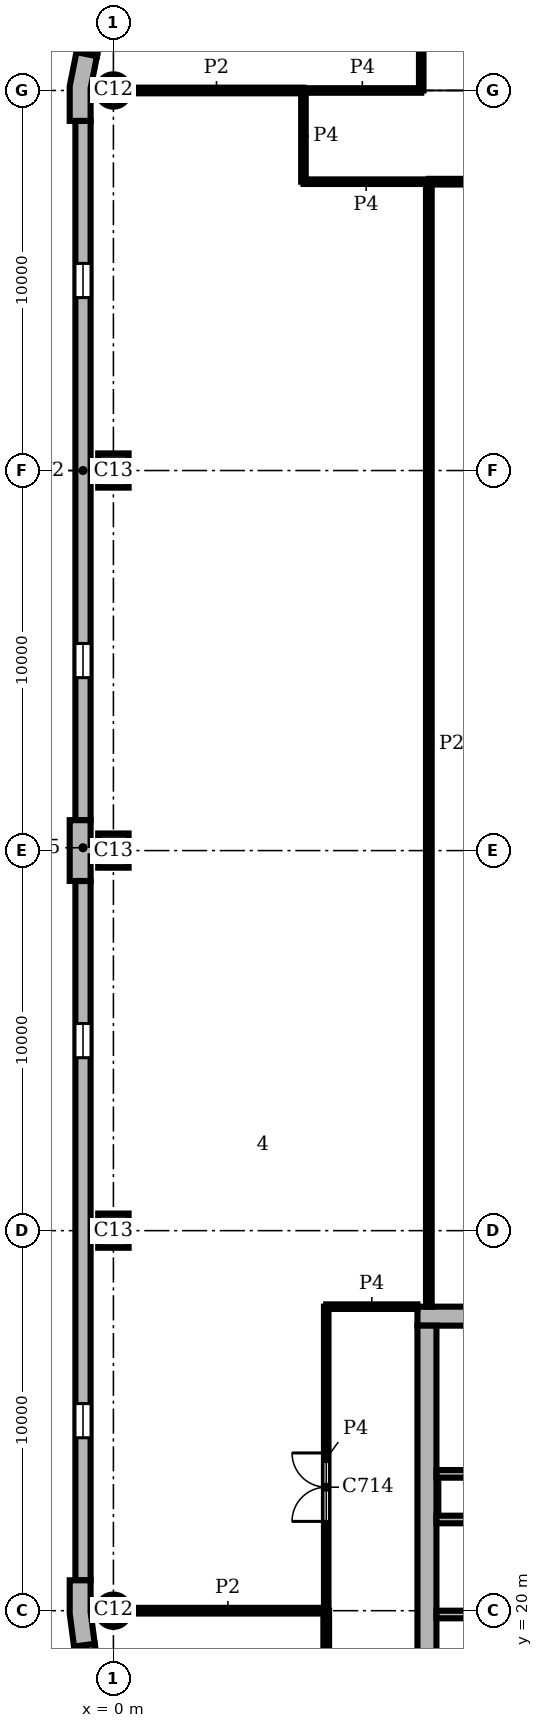
"""IFC4 building model, lengths in metres.
Left out: names, types, materials, properties, quantities, classifications, styles, units other than length and angle.
Written with IfcOpenShell. Run it as: python <this file> out.ifc"""

import sys

from ifc_helpers import new_model, si_unit, direction, frame, frame_2d, origin, origin_2d, place, context, subcontext, project, spatial, polyline, rectangle, circle, outline, extrude, element, fill, save


model = new_model("IFC4")
c1 = context("Model", 3, precision=1e-05, world=origin(), true_north=direction((0.0, 1.0)))
c2 = subcontext(c1, "Body", "Model", "MODEL_VIEW")
j1 = project(units=[si_unit("LENGTHUNIT", "METRE"), si_unit("PLANEANGLEUNIT", "RADIAN")], contexts=[c1])
p1 = place(None, origin())
s1 = spatial("IfcSite", under=j1, at=p1, CompositionType="ELEMENT")
p2 = place(p1, origin())
s2 = spatial("IfcBuilding", under=s1, at=p2, CompositionType="ELEMENT")
p3 = place(p2, frame((0.0, 0.0, 309.9)))
s3 = spatial("IfcBuildingStorey", under=s2, at=p3, CompositionType="ELEMENT", Elevation=309.9)
p4 = place(p3, frame((0.0, 60.0, 0.0), z_axis=(0.0, 0.0, 1.0), x_axis=(1.0, 0.0, 0.0)))
e1 = element("IfcColumn", 1, at=p4, inside=s3, PredefinedType="COLUMN", context=c2, shape_type="SweptSolid", body=[
    extrude(circle(Radius=0.425, at=origin_2d()), origin(), (0.0, 0.0, 1.0), 3.9),
])
for number, where, z_axis, x_axis in (
    (2, (0.0, 50.0, 0.0), (0.0, 0.0, 1.0), (0.0, 1.0, 0.0)),
    (3, (0.0, 40.0, 0.0), (0.0, 0.0, 1.0), (0.0, 1.0, 0.0)),
    (4, (0.0, 30.0, 0.0), (0.0, 0.0, 1.0), (0.0, 1.0, 0.0)),
):
    element("IfcColumn", number, at=place(p3, frame(where, z_axis=z_axis, x_axis=x_axis)), inside=s3, PredefinedType="COLUMN", context=c2, shape_type="SweptSolid", body=[
        extrude(rectangle(XDim=0.9, YDim=0.8, at=origin_2d()), origin(), (0.0, 0.0, 1.0), 3.9),
    ])
p5 = place(p3, frame((0.0, 20.0, 0.0), z_axis=(0.0, 0.0, 1.0), x_axis=(1.0, 0.0, 0.0)))
e5 = element("IfcColumn", 5, at=p5, inside=s3, PredefinedType="COLUMN", context=c2, shape_type="SweptSolid", body=[
    extrude(circle(Radius=0.425, at=origin_2d()), origin(), (0.0, 0.0, 1.0), 3.9),
])
p6 = place(p3, frame((28.0, 27.75, 0.0), z_axis=(0.0, 0.0, 1.0), x_axis=(-1.0, 0.0, 0.0)))
e6 = element("IfcWall", 6, at=p6, inside=s3, PredefinedType="SHEAR", context=c2, shape_type="SweptSolid", body=[
    extrude(rectangle(XDim=20.0, YDim=0.5, at=frame_2d((10.0, 0.0))), origin(), (0.0, 0.0, 1.0), 3.9),
])
p7 = place(p3, frame((8.25, 27.5, 0.0), z_axis=(0.0, 0.0, 1.0), x_axis=(0.0, -1.0, 0.0)))
e7 = element("IfcWall", 7, at=p7, inside=s3, PredefinedType="SHEAR", context=c2, shape_type="SweptSolid", body=[
    extrude(rectangle(XDim=19.0, YDim=0.5, at=frame_2d((9.5, 0.0))), origin(), (0.0, 0.0, 1.0), 3.9),
])
p8 = place(p3, origin())
e8 = element("IfcWall", 8, at=p8, inside=s3, PredefinedType="SOLIDWALL", context=c2, shape_type="SweptSolid", body=[
    extrude(outline(polyline([(-0.825, 60.98), (-0.972, 61.009), (-1.15, 60.113), (-1.15, 59.2), (-1.0, 59.2), (-0.6, 59.2), (-0.6, 60.059), (-0.432, 60.902), (-0.825, 60.98)])), origin(), (0.0, 0.0, 1.0), 3.9),
])
e9 = element("IfcWall", 9, at=p8, inside=s3, PredefinedType="SOLIDWALL", context=c2, shape_type="SweptSolid", body=[
    extrude(outline(polyline([(-0.6, 39.2), (-0.6, 39.85), (-0.45, 39.85), (-0.45, 40.15), (-0.6, 40.15), (-0.6, 40.8), (-1.0, 40.8), (-1.15, 40.8), (-1.15, 40.0), (-1.15, 39.2), (-1.0, 39.2), (-0.6, 39.2)])), origin(), (0.0, 0.0, 1.0), 3.9),
])
e10 = element("IfcWall", 10, at=p8, inside=s3, PredefinedType="SOLIDWALL", context=c2, shape_type="SweptSolid", body=[
    extrude(outline(polyline([(-1.0, 20.8), (-1.15, 20.8), (-1.15, 19.925), (-1.036, 19.057), (-0.887, 19.076), (-0.49, 19.128), (-0.6, 19.961), (-0.6, 20.8), (-1.0, 20.8)])), origin(), (0.0, 0.0, 1.0), 3.9),
])
p9 = place(p3, frame((0.299, 65.602, 0.0), z_axis=(0.0, 0.0, 1.0), x_axis=(-0.195098533057, -0.98078364709, 0.0)))
e11 = element("IfcWall", 11, at=p9, inside=s3, PredefinedType="SOLIDWALL", context=c2, shape_type="SweptSolid", body=[
    extrude(rectangle(XDim=4.753, YDim=0.4, at=frame_2d((2.376, 0.0))), origin(), (0.0, 0.0, 1.0), 3.9),
])
p10 = place(p9, frame((0.226, 0.0, 0.9)))
e12 = element("IfcOpeningElement", 12, at=p10, cuts=e11, PredefinedType="OPENING", context=c2, shape_type="SweptSolid", body=[
    extrude(rectangle(XDim=4.3, YDim=2.35, at=frame_2d((2.15, 1.175))), frame((0.0, 0.21, 0.0), z_axis=(0.0, -1.0, 0.0), x_axis=(1.0, 0.0, 0.0)), (0.0, 0.0, 1.0), 0.42),
])
p11 = place(p3, frame((-0.8, 59.2, 0.0), z_axis=(0.0, 0.0, 1.0), x_axis=(0.0, -1.0, 0.0)))
e13 = element("IfcWall", 13, at=p11, inside=s3, PredefinedType="SOLIDWALL", context=c2, shape_type="SweptSolid", body=[
    extrude(rectangle(XDim=18.4, YDim=0.4, at=frame_2d((9.2, 0.0))), origin(), (0.0, 0.0, 1.0), 3.9),
])
p12 = place(p11, frame((3.75, 0.0, 0.9)))
e14 = element("IfcOpeningElement", 14, at=p12, cuts=e13, PredefinedType="OPENING", context=c2, shape_type="SweptSolid", body=[
    extrude(rectangle(XDim=0.9, YDim=2.35, at=frame_2d((0.45, 1.175))), frame((0.0, 0.21, 0.0), z_axis=(0.0, -1.0, 0.0), x_axis=(1.0, 0.0, 0.0)), (0.0, 0.0, 1.0), 0.42),
])
p13 = place(p11, frame((13.75, 0.0, 0.9)))
e15 = element("IfcOpeningElement", 15, at=p13, cuts=e13, PredefinedType="OPENING", context=c2, shape_type="SweptSolid", body=[
    extrude(rectangle(XDim=0.9, YDim=2.35, at=frame_2d((0.45, 1.175))), frame((0.0, 0.21, 0.0), z_axis=(0.0, -1.0, 0.0), x_axis=(1.0, 0.0, 0.0)), (0.0, 0.0, 1.0), 0.42),
])
p14 = place(p3, frame((-0.8, 39.2, 0.0), z_axis=(0.0, 0.0, 1.0), x_axis=(0.0, -1.0, 0.0)))
e16 = element("IfcWall", 16, at=p14, inside=s3, PredefinedType="SOLIDWALL", context=c2, shape_type="SweptSolid", body=[
    extrude(rectangle(XDim=18.4, YDim=0.4, at=frame_2d((9.2, 0.0))), origin(), (0.0, 0.0, 1.0), 3.9),
])
p15 = place(p14, frame((3.75, 0.0, 0.9)))
e17 = element("IfcOpeningElement", 17, at=p15, cuts=e16, PredefinedType="OPENING", context=c2, shape_type="SweptSolid", body=[
    extrude(rectangle(XDim=0.9, YDim=2.35, at=frame_2d((0.45, 1.175))), frame((0.0, 0.21, 0.0), z_axis=(0.0, -1.0, 0.0), x_axis=(1.0, 0.0, 0.0)), (0.0, 0.0, 1.0), 0.42),
])
p16 = place(p14, frame((13.75, 0.0, 0.9)))
e18 = element("IfcOpeningElement", 18, at=p16, cuts=e16, PredefinedType="OPENING", context=c2, shape_type="SweptSolid", body=[
    extrude(rectangle(XDim=0.9, YDim=2.35, at=frame_2d((0.45, 1.175))), frame((0.0, 0.21, 0.0), z_axis=(0.0, -1.0, 0.0), x_axis=(1.0, 0.0, 0.0)), (0.0, 0.0, 1.0), 0.42),
])
p17 = place(p3, frame((-0.689, 19.102, 0.0), z_axis=(0.0, 0.0, 1.0), x_axis=(0.130514280502, -0.991446429508, 0.0)))
e19 = element("IfcWall", 19, at=p17, inside=s3, PredefinedType="SOLIDWALL", context=c2, shape_type="SweptSolid", body=[
    extrude(rectangle(XDim=4.121, YDim=0.4, at=frame_2d((2.061, 0.0))), origin(), (0.0, 0.0, 1.0), 3.9),
])
p18 = place(p17, frame((1.611, 0.0, 0.9)))
e20 = element("IfcOpeningElement", 20, at=p18, cuts=e19, PredefinedType="OPENING", context=c2, shape_type="SweptSolid", body=[
    extrude(rectangle(XDim=0.9, YDim=2.35, at=frame_2d((0.45, 1.175))), frame((0.0, 0.21, 0.0), z_axis=(0.0, -1.0, 0.0), x_axis=(1.0, 0.0, 0.0)), (0.0, 0.0, 1.0), 0.42),
])
for number, where, z_axis, x_axis in (
    (21, (8.5, 19.9, 0.0), (0.0, 0.0, 1.0), (1.0, 0.0, 0.0)),
    (22, (8.5, 22.4, 0.0), (0.0, 0.0, 1.0), (1.0, 0.0, 0.0)),
):
    element("IfcWall", number, at=place(p3, frame(where, z_axis=z_axis, x_axis=x_axis)), inside=s3, PredefinedType="SHEAR", context=c2, shape_type="SweptSolid", body=[
        extrude(rectangle(XDim=3.2, YDim=0.2, at=frame_2d((1.6, 0.0))), origin(), (0.0, 0.0, 1.0), 3.58),
    ])
p19 = place(p3, frame((8.5, 23.6, 0.0), z_axis=(0.0, 0.0, 1.0), x_axis=(1.0, 0.0, 0.0)))
e23 = element("IfcWall", 23, at=p19, inside=s3, PredefinedType="SHEAR", context=c2, shape_type="SweptSolid", body=[
    extrude(rectangle(XDim=5.3, YDim=0.2, at=frame_2d((2.65, 0.0))), origin(), (0.0, 0.0, 1.0), 3.58),
])
p20 = place(p3, frame((5.6, 15.0, 0.0), z_axis=(0.0, 0.0, 1.0), x_axis=(0.0, 1.0, 0.0)))
e24 = element("IfcWall", 24, at=p20, inside=s3, PredefinedType="PARTITIONING", context=c2, shape_type="SweptSolid", body=[
    extrude(rectangle(XDim=5.0, YDim=0.15, at=frame_2d((2.5, 0.0))), origin(), (0.0, 0.0, 1.0), 3.58),
])
p21 = place(p20, frame((1.85, 0.0, 0.0)))
e25 = element("IfcOpeningElement", 25, at=p21, cuts=e24, PredefinedType="OPENING", context=c2, shape_type="SweptSolid", body=[
    extrude(rectangle(XDim=0.8, YDim=2.1, at=frame_2d((0.4, 1.05))), frame((0.0, 0.085, 0.0), z_axis=(0.0, -1.0, 0.0), x_axis=(1.0, 0.0, 0.0)), (0.0, 0.0, 1.0), 0.17),
])
p22 = place(p3, frame((8.3, 28.0, 0.0), z_axis=(0.0, 0.0, 1.0), x_axis=(0.0, 1.0, 0.0)))
e26 = element("IfcWall", 26, at=p22, inside=s3, PredefinedType="PARTITIONING", context=c2, shape_type="SweptSolid", body=[
    extrude(rectangle(XDim=29.6, YDim=0.15, at=frame_2d((14.8, 0.0))), origin(), (0.0, 0.0, 1.0), 3.58),
])
p23 = place(p3, frame((0.425, 20.0, 0.0), z_axis=(0.0, 0.0, 1.0), x_axis=(1.0, 0.0, 0.0)))
e27 = element("IfcWall", 27, at=p23, inside=s3, PredefinedType="PARTITIONING", context=c2, shape_type="SweptSolid", body=[
    extrude(rectangle(XDim=5.175, YDim=0.15, at=frame_2d((2.587, 0.0))), origin(), (0.0, 0.0, 1.0), 3.58),
])
p24 = place(p3, frame((8.3, 57.6, 0.0), z_axis=(0.0, 0.0, 1.0), x_axis=(1.0, 0.0, 0.0)))
e28 = element("IfcWall", 28, at=p24, inside=s3, PredefinedType="PARTITIONING", context=c2, shape_type="SweptSolid", body=[
    extrude(rectangle(XDim=5.5, YDim=0.15, at=frame_2d((2.75, 0.0))), origin(), (0.0, 0.0, 1.0), 3.58),
])
p25 = place(p3, frame((0.425, 60.0, 0.0), z_axis=(0.0, 0.0, 1.0), x_axis=(1.0, 0.0, 0.0)))
e29 = element("IfcWall", 29, at=p25, inside=s3, PredefinedType="PARTITIONING", context=c2, shape_type="SweptSolid", body=[
    extrude(rectangle(XDim=4.575, YDim=0.15, at=frame_2d((2.288, 0.0))), origin(), (0.0, 0.0, 1.0), 3.58),
])
p26 = place(p3, frame((5.0, 57.6, 0.0), z_axis=(0.0, 0.0, 1.0), x_axis=(0.0, 1.0, 0.0)))
e30 = element("IfcWall", 30, at=p26, inside=s3, PredefinedType="PARTITIONING", context=c2, shape_type="SweptSolid", body=[
    extrude(rectangle(XDim=2.4, YDim=0.12, at=frame_2d((1.2, 0.0))), origin(), (0.0, 0.0, 1.0), 3.58),
])
p27 = place(p3, frame((5.6, 20.0, 0.0), z_axis=(0.0, 0.0, 1.0), x_axis=(0.0, 1.0, 0.0)))
e31 = element("IfcWall", 31, at=p27, inside=s3, PredefinedType="PARTITIONING", context=c2, shape_type="SweptSolid", body=[
    extrude(rectangle(XDim=8.0, YDim=0.12, at=frame_2d((4.0, 0.0))), origin(), (0.0, 0.0, 1.0), 3.58),
])
p28 = place(p27, frame((2.35, 0.0, 0.0)))
e32 = element("IfcOpeningElement", 32, at=p28, cuts=e31, PredefinedType="OPENING", context=c2, shape_type="SweptSolid", body=[
    extrude(rectangle(XDim=1.8, YDim=2.1, at=frame_2d((0.9, 1.05))), frame((0.0, 0.07, 0.0), z_axis=(0.0, -1.0, 0.0), x_axis=(1.0, 0.0, 0.0)), (0.0, 0.0, 1.0), 0.14),
])
p29 = place(p3, frame((8.1, 60.0, 0.0), z_axis=(0.0, 0.0, 1.0), x_axis=(0.0, 1.0, 0.0)))
e33 = element("IfcWall", 33, at=p29, inside=s3, PredefinedType="PARTITIONING", context=c2, shape_type="SweptSolid", body=[
    extrude(rectangle(XDim=6.4, YDim=0.12, at=frame_2d((3.2, 0.0))), origin(), (0.0, 0.0, 1.0), 3.58),
])
p30 = place(p29, frame((2.1, 0.0, 0.0)))
e34 = element("IfcOpeningElement", 34, at=p30, cuts=e33, PredefinedType="OPENING", context=c2, shape_type="SweptSolid", body=[
    extrude(rectangle(XDim=1.8, YDim=2.1, at=frame_2d((0.9, 1.05))), frame((0.0, 0.07, 0.0), z_axis=(0.0, -1.0, 0.0), x_axis=(1.0, 0.0, 0.0)), (0.0, 0.0, 1.0), 0.14),
])
p31 = place(p3, frame((5.6, 28.0, 0.0), z_axis=(0.0, 0.0, 1.0), x_axis=(1.0, 0.0, 0.0)))
e35 = element("IfcWall", 35, at=p31, inside=s3, PredefinedType="PARTITIONING", context=c2, shape_type="SweptSolid", body=[
    extrude(rectangle(XDim=2.4, YDim=0.12, at=frame_2d((1.2, 0.0))), origin(), (0.0, 0.0, 1.0), 3.58),
])
p32 = place(p3, frame((5.0, 57.6, 0.0), z_axis=(0.0, 0.0, 1.0), x_axis=(1.0, 0.0, 0.0)))
e36 = element("IfcWall", 36, at=p32, inside=s3, PredefinedType="PARTITIONING", context=c2, shape_type="SweptSolid", body=[
    extrude(rectangle(XDim=3.3, YDim=0.12, at=frame_2d((1.65, 0.0))), origin(), (0.0, 0.0, 1.0), 3.58),
])
p33 = place(p3, frame((5.0, 60.0, 0.0), z_axis=(0.0, 0.0, 1.0), x_axis=(1.0, 0.0, 0.0)))
e37 = element("IfcWall", 37, at=p33, inside=s3, PredefinedType="PARTITIONING", context=c2, shape_type="SweptSolid", body=[
    extrude(rectangle(XDim=3.1, YDim=0.12, at=frame_2d((1.55, 0.0))), origin(), (0.0, 0.0, 1.0), 3.58),
])
p34 = place(p12, origin())
e38 = element("IfcWindow", 38, at=p34, inside=s3, PartitioningType="SINGLE_PANEL", PredefinedType="WINDOW", context=c2, shape_type="SweptSolid", body=[
    extrude(rectangle(XDim=0.9, YDim=2.35, at=frame_2d((0.45, 1.175))), frame((0.0, 0.16, 0.0), z_axis=(0.0, -1.0, 0.0), x_axis=(1.0, 0.0, 0.0)), (0.0, 0.0, 1.0), 0.06),
])
fill(e14, e38)
p35 = place(p13, origin())
e39 = element("IfcWindow", 39, at=p35, inside=s3, PartitioningType="SINGLE_PANEL", PredefinedType="WINDOW", context=c2, shape_type="SweptSolid", body=[
    extrude(rectangle(XDim=0.9, YDim=2.35, at=frame_2d((0.45, 1.175))), frame((0.0, 0.16, 0.0), z_axis=(0.0, -1.0, 0.0), x_axis=(1.0, 0.0, 0.0)), (0.0, 0.0, 1.0), 0.06),
])
fill(e15, e39)
p36 = place(p15, origin())
e40 = element("IfcWindow", 40, at=p36, inside=s3, PartitioningType="SINGLE_PANEL", PredefinedType="WINDOW", context=c2, shape_type="SweptSolid", body=[
    extrude(rectangle(XDim=0.9, YDim=2.35, at=frame_2d((0.45, 1.175))), frame((0.0, 0.16, 0.0), z_axis=(0.0, -1.0, 0.0), x_axis=(1.0, 0.0, 0.0)), (0.0, 0.0, 1.0), 0.06),
])
fill(e17, e40)
p37 = place(p16, origin())
e41 = element("IfcWindow", 41, at=p37, inside=s3, PartitioningType="SINGLE_PANEL", PredefinedType="WINDOW", context=c2, shape_type="SweptSolid", body=[
    extrude(rectangle(XDim=0.9, YDim=2.35, at=frame_2d((0.45, 1.175))), frame((0.0, 0.16, 0.0), z_axis=(0.0, -1.0, 0.0), x_axis=(1.0, 0.0, 0.0)), (0.0, 0.0, 1.0), 0.06),
])
fill(e18, e41)
p38 = place(p28, origin())
e42 = element("IfcDoor", 42, at=p38, inside=s3, OperationType="DOUBLE_DOOR_SINGLE_SWING", PredefinedType="DOOR", context=c2, shape_type="SweptSolid", body=[
    extrude(rectangle(XDim=1.8, YDim=2.1, at=frame_2d((0.9, 1.05))), frame((0.0, 0.025, 0.0), z_axis=(0.0, -1.0, 0.0), x_axis=(1.0, 0.0, 0.0)), (0.0, 0.0, 1.0), 0.05),
])
fill(e32, e42)
save(model, sys.argv[1])
